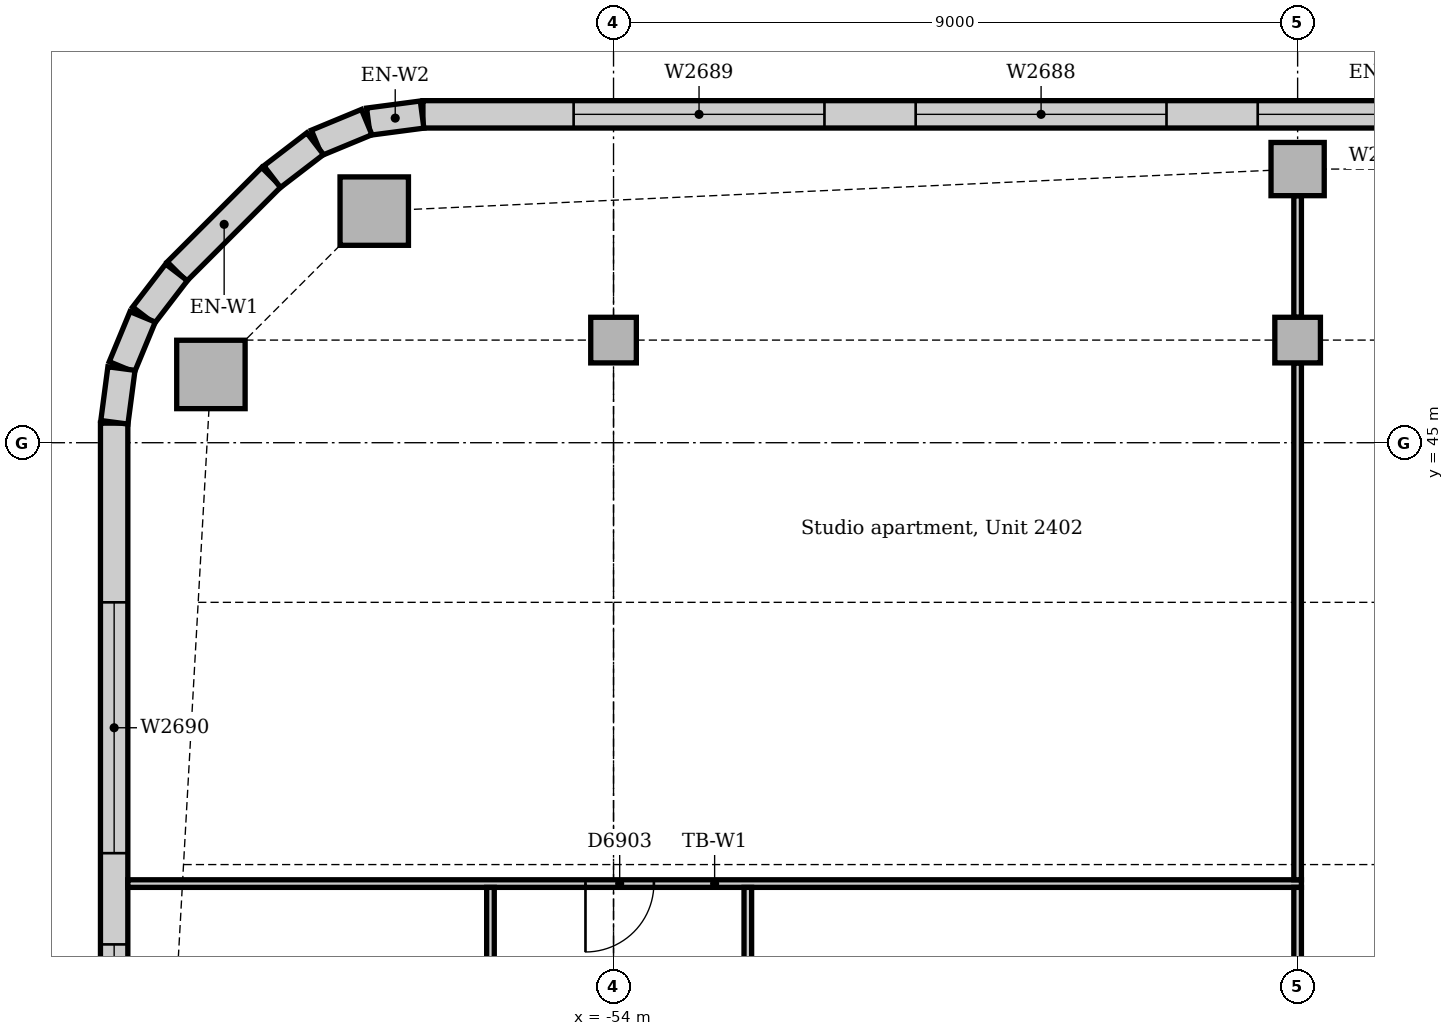
"""IFC4 building model, lengths in metres.
Left out: names, types, materials, properties, quantities, classifications, styles, units other than length and angle.
Written with IfcOpenShell. Run it as: python <this file> out.ifc"""

import sys

from ifc_helpers import new_model, si_unit, direction, frame, frame_2d, origin, origin_2d, place, context, subcontext, project, spatial, rectangle, extrude, element, fill, save


model = new_model("IFC4")
c1 = context("Model", 3, precision=1e-05, world=origin(), true_north=direction((0.0, 1.0)))
c2 = subcontext(c1, "Body", "Model", "MODEL_VIEW")
j1 = project(units=[si_unit("LENGTHUNIT", "METRE"), si_unit("PLANEANGLEUNIT", "RADIAN")], contexts=[c1])
p1 = place(None, origin())
s1 = spatial("IfcSite", under=j1, at=p1, CompositionType="ELEMENT")
p2 = place(p1, origin())
s2 = spatial("IfcBuilding", under=s1, at=p2, CompositionType="ELEMENT")
p3 = place(p2, frame((0.0, 0.0, 104.0)))
s3 = spatial("IfcBuildingStorey", under=s2, at=p3, CompositionType="ELEMENT", Elevation=104.0)
for number, where, z_axis, x_axis in (
    (1, (-57.148, 48.047, 0.0), (0.0, 0.0, 1.0), (1.0, 0.0, 0.0)),
    (2, (-59.297, 45.898, 0.0), (0.0, 0.0, 1.0), (1.0, 0.0, 0.0)),
):
    element("IfcColumn", number, at=place(p3, frame(where, z_axis=z_axis, x_axis=x_axis)), inside=s3, PredefinedType="COLUMN", context=c2, shape_type="SweptSolid", body=[
        extrude(rectangle(XDim=0.9, YDim=0.9, at=origin_2d()), origin(), (0.0, 0.0, 1.0), 3.85),
    ])
p4 = place(p3, frame((-45.0, 48.6, 0.0), z_axis=(0.0, 0.0, 1.0), x_axis=(1.0, 0.0, 0.0)))
e3 = element("IfcColumn", 3, at=p4, inside=s3, PredefinedType="COLUMN", context=c2, shape_type="SweptSolid", body=[
    extrude(rectangle(XDim=0.7, YDim=0.7, at=origin_2d()), origin(), (0.0, 0.0, 1.0), 3.85),
])
for number, where, z_axis, x_axis in (
    (4, (-54.0, 46.35, 0.0), (0.0, 0.0, 1.0), (1.0, 0.0, 0.0)),
    (5, (-45.0, 46.35, 0.0), (0.0, 0.0, 1.0), (1.0, 0.0, 0.0)),
):
    element("IfcColumn", number, at=place(p3, frame(where, z_axis=z_axis, x_axis=x_axis)), inside=s3, PredefinedType="COLUMN", context=c2, shape_type="SweptSolid", body=[
        extrude(rectangle(XDim=0.6, YDim=0.6, at=origin_2d()), origin(), (0.0, 0.0, 1.0), 3.85),
    ])
p5 = place(p3, frame((-31.243, 49.32, 0.0), z_axis=(0.0, 0.0, 1.0), x_axis=(-1.0, 0.0, 0.0)))
e6 = element("IfcWall", 6, at=p5, inside=s3, PredefinedType="STANDARD", context=c2, shape_type="SweptSolid", body=[
    extrude(rectangle(XDim=25.265, YDim=0.36, at=frame_2d((12.632, 0.0))), origin(), (0.0, 0.0, 1.0), 3.85),
])
p6 = place(p5, frame((1.982, 0.0, 0.9)))
e7 = element("IfcOpeningElement", 7, at=p6, cuts=e6, PredefinedType="OPENING", context=c2, shape_type="SweptSolid", body=[
    extrude(rectangle(XDim=3.3, YDim=1.6, at=frame_2d((1.65, 0.8))), frame((0.0, 0.19, 0.0), z_axis=(0.0, -1.0, 0.0), x_axis=(1.0, 0.0, 0.0)), (0.0, 0.0, 1.0), 0.38),
])
p7 = place(p5, frame((6.482, 0.0, 0.9)))
e8 = element("IfcOpeningElement", 8, at=p7, cuts=e6, PredefinedType="OPENING", context=c2, shape_type="SweptSolid", body=[
    extrude(rectangle(XDim=3.3, YDim=1.6, at=frame_2d((1.65, 0.8))), frame((0.0, 0.19, 0.0), z_axis=(0.0, -1.0, 0.0), x_axis=(1.0, 0.0, 0.0)), (0.0, 0.0, 1.0), 0.38),
])
p8 = place(p5, frame((10.982, 0.0, 0.9)))
e9 = element("IfcOpeningElement", 9, at=p8, cuts=e6, PredefinedType="OPENING", context=c2, shape_type="SweptSolid", body=[
    extrude(rectangle(XDim=3.3, YDim=1.6, at=frame_2d((1.65, 0.8))), frame((0.0, 0.19, 0.0), z_axis=(0.0, -1.0, 0.0), x_axis=(1.0, 0.0, 0.0)), (0.0, 0.0, 1.0), 0.38),
])
p9 = place(p5, frame((15.482, 0.0, 0.9)))
e10 = element("IfcOpeningElement", 10, at=p9, cuts=e6, PredefinedType="OPENING", context=c2, shape_type="SweptSolid", body=[
    extrude(rectangle(XDim=3.3, YDim=1.6, at=frame_2d((1.65, 0.8))), frame((0.0, 0.19, 0.0), z_axis=(0.0, -1.0, 0.0), x_axis=(1.0, 0.0, 0.0)), (0.0, 0.0, 1.0), 0.38),
])
p10 = place(p5, frame((19.982, 0.0, 0.9)))
e11 = element("IfcOpeningElement", 11, at=p10, cuts=e6, PredefinedType="OPENING", context=c2, shape_type="SweptSolid", body=[
    extrude(rectangle(XDim=3.3, YDim=1.6, at=frame_2d((1.65, 0.8))), frame((0.0, 0.19, 0.0), z_axis=(0.0, -1.0, 0.0), x_axis=(1.0, 0.0, 0.0)), (0.0, 0.0, 1.0), 0.38),
])
p11 = place(p3, frame((-58.501, 48.494, 0.0), z_axis=(0.0, 0.0, 1.0), x_axis=(-0.707106781187, -0.707106781187, 0.0)))
e12 = element("IfcWall", 12, at=p11, inside=s3, PredefinedType="STANDARD", context=c2, shape_type="SweptSolid", body=[
    extrude(rectangle(XDim=1.757, YDim=0.36, at=frame_2d((0.879, 0.0))), origin(), (0.0, 0.0, 1.0), 3.85),
])
p12 = place(p3, frame((-60.57, 45.257, 0.0), z_axis=(0.0, 0.0, 1.0), x_axis=(0.0, -1.0, 0.0)))
e13 = element("IfcWall", 13, at=p12, inside=s3, PredefinedType="STANDARD", context=c2, shape_type="SweptSolid", body=[
    extrude(rectangle(XDim=21.515, YDim=0.36, at=frame_2d((10.757, 0.0))), origin(), (0.0, 0.0, 1.0), 3.85),
])
p13 = place(p12, frame((2.357, 0.0, 0.9)))
e14 = element("IfcOpeningElement", 14, at=p13, cuts=e13, PredefinedType="OPENING", context=c2, shape_type="SweptSolid", body=[
    extrude(rectangle(XDim=3.3, YDim=1.6, at=frame_2d((1.65, 0.8))), frame((0.0, 0.19, 0.0), z_axis=(0.0, -1.0, 0.0), x_axis=(1.0, 0.0, 0.0)), (0.0, 0.0, 1.0), 0.38),
])
p14 = place(p12, frame((6.857, 0.0, 0.9)))
e15 = element("IfcOpeningElement", 15, at=p14, cuts=e13, PredefinedType="OPENING", context=c2, shape_type="SweptSolid", body=[
    extrude(rectangle(XDim=3.3, YDim=1.6, at=frame_2d((1.65, 0.8))), frame((0.0, 0.19, 0.0), z_axis=(0.0, -1.0, 0.0), x_axis=(1.0, 0.0, 0.0)), (0.0, 0.0, 1.0), 0.38),
])
p15 = place(p12, frame((11.357, 0.0, 0.9)))
e16 = element("IfcOpeningElement", 16, at=p15, cuts=e13, PredefinedType="OPENING", context=c2, shape_type="SweptSolid", body=[
    extrude(rectangle(XDim=3.3, YDim=1.6, at=frame_2d((1.65, 0.8))), frame((0.0, 0.19, 0.0), z_axis=(0.0, -1.0, 0.0), x_axis=(1.0, 0.0, 0.0)), (0.0, 0.0, 1.0), 0.38),
])
p16 = place(p12, frame((15.857, 0.0, 0.9)))
e17 = element("IfcOpeningElement", 17, at=p16, cuts=e13, PredefinedType="OPENING", context=c2, shape_type="SweptSolid", body=[
    extrude(rectangle(XDim=3.3, YDim=1.6, at=frame_2d((1.65, 0.8))), frame((0.0, 0.19, 0.0), z_axis=(0.0, -1.0, 0.0), x_axis=(1.0, 0.0, 0.0)), (0.0, 0.0, 1.0), 0.38),
])
for number, where, z_axis, x_axis in (
    (18, (-56.519, 49.317, 0.0), (0.0, 0.0, 1.0), (-0.991, -0.131, 0.0)),
    (19, (-57.247, 49.218, 0.0), (0.0, 0.0, 1.0), (-0.924, -0.383, 0.0)),
):
    element("IfcWall", number, at=place(p3, frame(where, z_axis=z_axis, x_axis=x_axis)), inside=s3, PredefinedType="STANDARD", context=c2, shape_type="SweptSolid", body=[
        extrude(rectangle(XDim=0.713, YDim=0.36, at=frame_2d((0.356, 0.0))), origin(), (0.0, 0.0, 1.0), 3.85),
    ])
for number, where, z_axis, x_axis in (
    (20, (-57.925, 48.934, 0.0), (0.0, 0.0, 1.0), (-0.793, -0.609, 0.0)),
    (21, (-59.75, 47.241, 0.0), (0.0, 0.0, 1.0), (-0.609, -0.793, 0.0)),
):
    element("IfcWall", number, at=place(p3, frame(where, z_axis=z_axis, x_axis=x_axis)), inside=s3, PredefinedType="STANDARD", context=c2, shape_type="SweptSolid", body=[
        extrude(rectangle(XDim=0.713, YDim=0.36, at=frame_2d((0.357, 0.0))), origin(), (0.0, 0.0, 1.0), 3.85),
    ])
for number, where, z_axis, x_axis in (
    (22, (-60.195, 46.656, 0.0), (0.0, 0.0, 1.0), (-0.383, -0.924, 0.0)),
    (23, (-60.474, 45.976, 0.0), (0.0, 0.0, 1.0), (-0.131, -0.991, 0.0)),
):
    element("IfcWall", number, at=place(p3, frame(where, z_axis=z_axis, x_axis=x_axis)), inside=s3, PredefinedType="STANDARD", context=c2, shape_type="SweptSolid", body=[
        extrude(rectangle(XDim=0.713, YDim=0.36, at=frame_2d((0.356, 0.0))), origin(), (0.0, 0.0, 1.0), 3.85),
    ])
p17 = place(p3, frame((-60.39, 39.2, 0.0), z_axis=(0.0, 0.0, 1.0), x_axis=(1.0, 0.0, 0.0)))
e24 = element("IfcWall", 24, at=p17, inside=s3, PredefinedType="PARTITIONING", context=c2, shape_type="SweptSolid", body=[
    extrude(rectangle(XDim=15.44, YDim=0.1, at=frame_2d((7.72, 0.0))), origin(), (0.0, 0.0, 1.0), 3.85),
])
p18 = place(p17, frame((6.021, 0.0, 0.0)))
e25 = element("IfcOpeningElement", 25, at=p18, cuts=e24, PredefinedType="OPENING", context=c2, shape_type="SweptSolid", body=[
    extrude(rectangle(XDim=0.9, YDim=2.1, at=frame_2d((0.45, 1.05))), frame((0.0, 0.06, 0.0), z_axis=(0.0, -1.0, 0.0), x_axis=(1.0, 0.0, 0.0)), (0.0, 0.0, 1.0), 0.12),
])
p19 = place(p3, frame((-45.0, 39.25, 0.0), z_axis=(0.0, 0.0, 1.0), x_axis=(0.0, 1.0, 0.0)))
e26 = element("IfcWall", 26, at=p19, inside=s3, PredefinedType="PARTITIONING", context=c2, shape_type="SweptSolid", body=[
    extrude(rectangle(XDim=6.8, YDim=0.1, at=frame_2d((3.4, 0.0))), origin(), (0.0, 0.0, 1.0), 3.362),
])
p20 = place(p3, frame((-45.0, 36.3, 0.0), z_axis=(0.0, 0.0, 1.0), x_axis=(0.0, 1.0, 0.0)))
e27 = element("IfcWall", 27, at=p20, inside=s3, PredefinedType="PARTITIONING", context=c2, shape_type="SweptSolid", body=[
    extrude(rectangle(XDim=2.85, YDim=0.1, at=frame_2d((1.425, 0.0))), origin(), (0.0, 0.0, 1.0), 3.362),
])
p21 = place(p3, frame((-45.0, 46.65, 0.0), z_axis=(0.0, 0.0, 1.0), x_axis=(0.0, 1.0, 0.0)))
e28 = element("IfcWall", 28, at=p21, inside=s3, PredefinedType="PARTITIONING", context=c2, shape_type="SweptSolid", body=[
    extrude(rectangle(XDim=1.6, YDim=0.1, at=frame_2d((0.8, 0.0))), origin(), (0.0, 0.0, 1.0), 3.652),
])
p22 = place(p3, frame((-55.619, 36.075, 0.0), z_axis=(0.0, 0.0, 1.0), x_axis=(0.0, 1.0, 0.0)))
e29 = element("IfcWall", 29, at=p22, inside=s3, PredefinedType="PARTITIONING", context=c2, shape_type="SweptSolid", body=[
    extrude(rectangle(XDim=3.075, YDim=0.1, at=frame_2d((1.538, 0.0))), origin(), (0.0, 0.0, 1.0), 3.85),
])
p23 = place(p22, frame((1.1, 0.0, 0.0)))
e30 = element("IfcOpeningElement", 30, at=p23, cuts=e29, PredefinedType="OPENING", context=c2, shape_type="SweptSolid", body=[
    extrude(rectangle(XDim=0.9, YDim=2.1, at=frame_2d((0.45, 1.05))), frame((0.0, 0.06, 0.0), z_axis=(0.0, -1.0, 0.0), x_axis=(1.0, 0.0, 0.0)), (0.0, 0.0, 1.0), 0.12),
])
p24 = place(p3, frame((-52.233, 36.075, 0.0), z_axis=(0.0, 0.0, 1.0), x_axis=(0.0, 1.0, 0.0)))
e31 = element("IfcWall", 31, at=p24, inside=s3, PredefinedType="PARTITIONING", context=c2, shape_type="SweptSolid", body=[
    extrude(rectangle(XDim=3.075, YDim=0.1, at=frame_2d((1.538, 0.0))), origin(), (0.0, 0.0, 1.0), 3.85),
])
p25 = place(p24, frame((1.1, 0.0, 0.0)))
e32 = element("IfcOpeningElement", 32, at=p25, cuts=e31, PredefinedType="OPENING", context=c2, shape_type="SweptSolid", body=[
    extrude(rectangle(XDim=0.9, YDim=2.1, at=frame_2d((0.45, 1.05))), frame((0.0, 0.06, 0.0), z_axis=(0.0, -1.0, 0.0), x_axis=(1.0, 0.0, 0.0)), (0.0, 0.0, 1.0), 0.12),
])
p26 = place(p8, origin())
e33 = element("IfcWindow", 33, at=p26, inside=s3, PartitioningType="SINGLE_PANEL", PredefinedType="WINDOW", context=c2, shape_type="SweptSolid", body=[
    extrude(rectangle(XDim=3.3, YDim=1.6, at=frame_2d((1.65, 0.8))), frame((0.0, 0.13, 0.0), z_axis=(0.0, -1.0, 0.0), x_axis=(1.0, 0.0, 0.0)), (0.0, 0.0, 1.0), 0.06),
])
fill(e9, e33)
p27 = place(p9, origin())
e34 = element("IfcWindow", 34, at=p27, inside=s3, PartitioningType="SINGLE_PANEL", PredefinedType="WINDOW", context=c2, shape_type="SweptSolid", body=[
    extrude(rectangle(XDim=3.3, YDim=1.6, at=frame_2d((1.65, 0.8))), frame((0.0, 0.13, 0.0), z_axis=(0.0, -1.0, 0.0), x_axis=(1.0, 0.0, 0.0)), (0.0, 0.0, 1.0), 0.06),
])
fill(e10, e34)
p28 = place(p10, origin())
e35 = element("IfcWindow", 35, at=p28, inside=s3, PartitioningType="SINGLE_PANEL", PredefinedType="WINDOW", context=c2, shape_type="SweptSolid", body=[
    extrude(rectangle(XDim=3.3, YDim=1.6, at=frame_2d((1.65, 0.8))), frame((0.0, 0.13, 0.0), z_axis=(0.0, -1.0, 0.0), x_axis=(1.0, 0.0, 0.0)), (0.0, 0.0, 1.0), 0.06),
])
fill(e11, e35)
p29 = place(p13, origin())
e36 = element("IfcWindow", 36, at=p29, inside=s3, PartitioningType="SINGLE_PANEL", PredefinedType="WINDOW", context=c2, shape_type="SweptSolid", body=[
    extrude(rectangle(XDim=3.3, YDim=1.6, at=frame_2d((1.65, 0.8))), frame((0.0, 0.13, 0.0), z_axis=(0.0, -1.0, 0.0), x_axis=(1.0, 0.0, 0.0)), (0.0, 0.0, 1.0), 0.06),
])
fill(e14, e36)
p30 = place(p14, origin())
e37 = element("IfcWindow", 37, at=p30, inside=s3, PartitioningType="SINGLE_PANEL", PredefinedType="WINDOW", context=c2, shape_type="SweptSolid", body=[
    extrude(rectangle(XDim=3.3, YDim=1.6, at=frame_2d((1.65, 0.8))), frame((0.0, 0.13, 0.0), z_axis=(0.0, -1.0, 0.0), x_axis=(1.0, 0.0, 0.0)), (0.0, 0.0, 1.0), 0.06),
])
fill(e15, e37)
p31 = place(p18, frame((0.9, 0.0, 0.0), z_axis=(0.0, 0.0, 1.0), x_axis=(-1.0, 0.0, 0.0)))
e38 = element("IfcDoor", 38, at=p31, inside=s3, OperationType="SINGLE_SWING_RIGHT", PredefinedType="DOOR", context=c2, shape_type="SweptSolid", body=[
    extrude(rectangle(XDim=0.9, YDim=2.1, at=frame_2d((0.45, 1.05))), frame((0.0, 0.025, 0.0), z_axis=(0.0, -1.0, 0.0), x_axis=(1.0, 0.0, 0.0)), (0.0, 0.0, 1.0), 0.05),
])
fill(e25, e38)
save(model, sys.argv[1])
